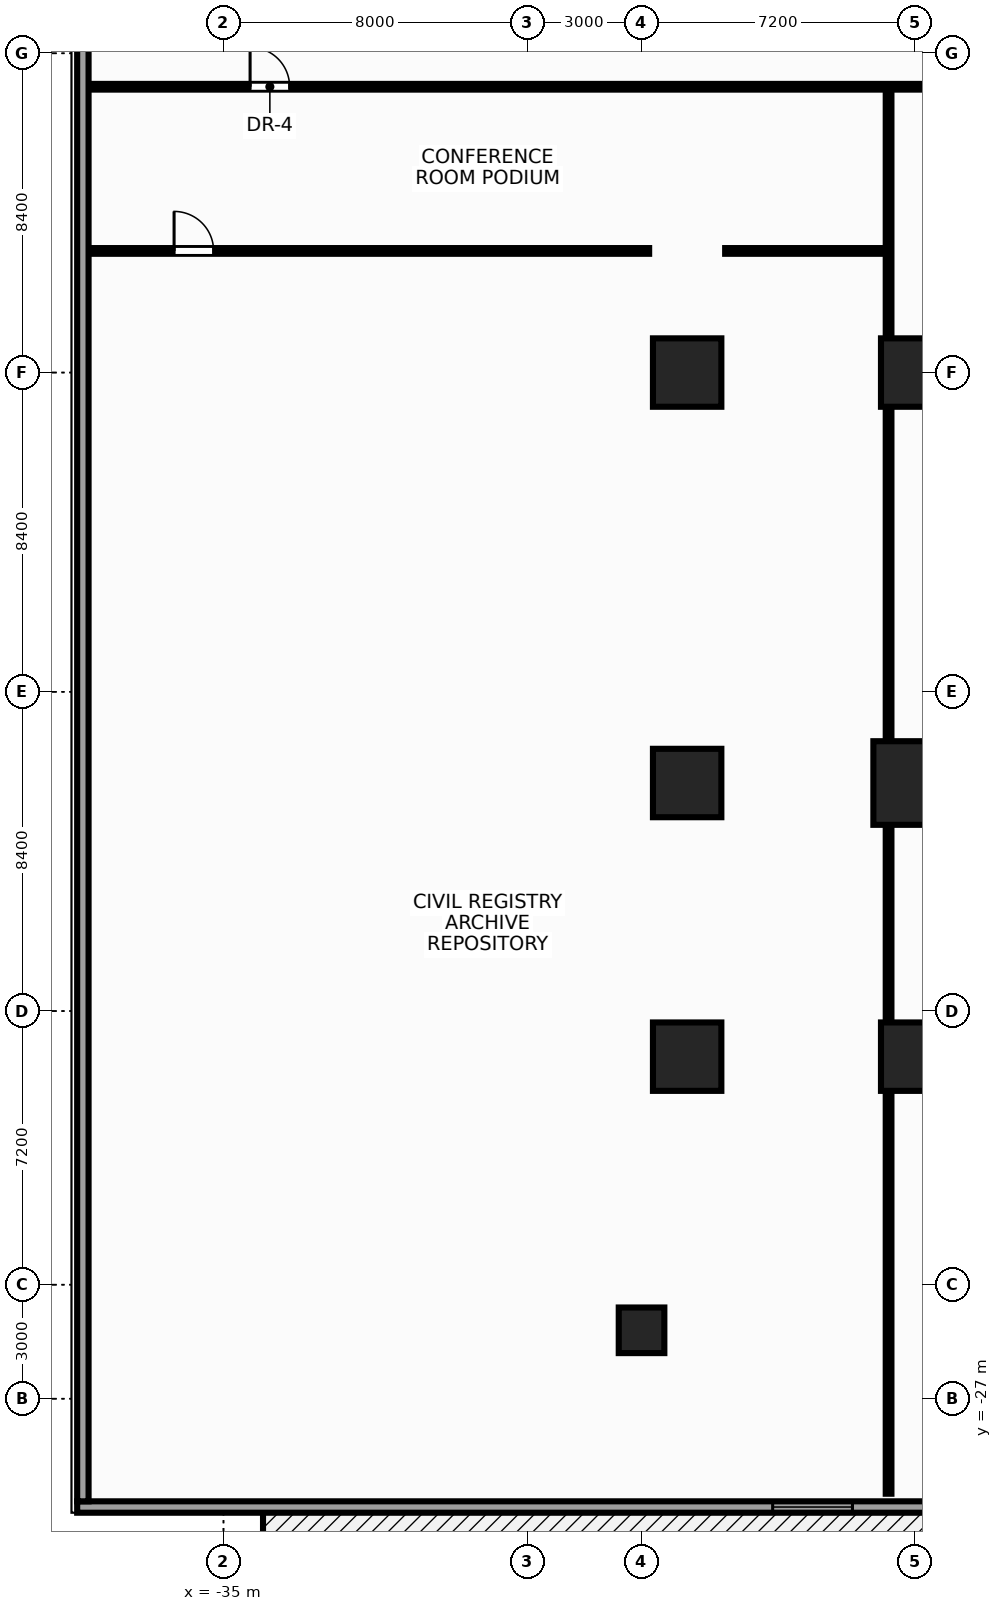
"""IFC4 building model, lengths in metres.
Left out: names, types, materials, properties, quantities, classifications, styles, units other than length and angle.
Written with IfcOpenShell. Run it as: python <this file> out.ifc"""

import sys

from ifc_helpers import new_model, si_unit, direction, frame, frame_2d, origin, origin_2d, place, context, subcontext, project, spatial, rectangle, hollow_rectangle, extrude, source, transform, mapped, element, fill, save


model = new_model("IFC4")
c1 = context("Model", 3, precision=1e-05, world=origin(), true_north=direction((0.0, 1.0)))
c2 = subcontext(c1, "Body", "Model", "MODEL_VIEW")
j1 = project(units=[si_unit("LENGTHUNIT", "METRE"), si_unit("PLANEANGLEUNIT", "RADIAN")], contexts=[c1])
p1 = place(None, origin())
s1 = spatial("IfcSite", under=j1, at=p1, CompositionType="ELEMENT")
p2 = place(p1, origin())
s2 = spatial("IfcBuilding", under=s1, at=p2, CompositionType="ELEMENT")
p3 = place(p2, frame((0.0, 0.0, 5.0)))
s3 = spatial("IfcBuildingStorey", under=s2, at=p3, CompositionType="ELEMENT", Elevation=5.0)
m1 = source(origin(), c2, "Body", "SweptSolid", [
    extrude(hollow_rectangle(XDim=1.2, YDim=1.2, WallThickness=0.055, at=origin_2d()), origin(), (0.0, 0.0, 1.0), 4.65),
])
p4 = place(p3, frame((-24.0, -25.2, 0.0), z_axis=(0.0, 0.0, 1.0), x_axis=(1.0, 0.0, 0.0)))
e1 = element("IfcColumn", 1, at=p4, inside=s3, PredefinedType="COLUMN", context=c2, shape_type="MappedRepresentation", body=[
    mapped(m1, transform((0.0, 0.0, 0.0), x_axis=(1.0, 0.0, 0.0), y_axis=(0.0, 1.0, 0.0), z_axis=(0.0, 0.0, 1.0), scale=1.0)),
])
m2 = source(origin(), c2, "Body", "SweptSolid", [
    extrude(rectangle(XDim=1.8, YDim=1.8, at=origin_2d()), origin(), (0.0, 0.0, 1.0), 4.65),
])
p5 = place(p3, frame((-16.8, -18.0, 0.0), z_axis=(0.0, 0.0, 1.0), x_axis=(1.0, 0.0, 0.0)))
e2 = element("IfcColumn", 2, at=p5, inside=s3, PredefinedType="COLUMN", context=c2, shape_type="MappedRepresentation", body=[
    mapped(m2, transform((0.0, 0.0, 0.0), x_axis=(1.0, 0.0, 0.0), y_axis=(0.0, 1.0, 0.0), z_axis=(0.0, 0.0, 1.0), scale=1.0)),
])
m3 = source(origin(), c2, "Body", "SweptSolid", [
    extrude(rectangle(XDim=2.2, YDim=2.2, at=origin_2d()), origin(), (0.0, 0.0, 1.0), 4.65),
])
p6 = place(p3, frame((-16.8, -10.8, 0.0), z_axis=(0.0, 0.0, 1.0), x_axis=(1.0, 0.0, 0.0)))
e3 = element("IfcColumn", 3, at=p6, inside=s3, PredefinedType="COLUMN", context=c2, shape_type="MappedRepresentation", body=[
    mapped(m3, transform((0.0, 0.0, 0.0), x_axis=(1.0, 0.0, 0.0), y_axis=(0.0, 1.0, 0.0), z_axis=(0.0, 0.0, 1.0), scale=1.0)),
])
for number, where, z_axis, x_axis in (
    (4, (-16.8, 0.0, 0.0), (0.0, 0.0, 1.0), (1.0, 0.0, 0.0)),
    (5, (-22.8, -18.0, 0.0), (0.0, 0.0, 1.0), (1.0, 0.0, 0.0)),
    (6, (-22.8, -10.8, 0.0), (0.0, 0.0, 1.0), (1.0, 0.0, 0.0)),
    (7, (-22.8, 0.0, 0.0), (0.0, 0.0, 1.0), (1.0, 0.0, 0.0)),
):
    element("IfcColumn", number, at=place(p3, frame(where, z_axis=z_axis, x_axis=x_axis)), inside=s3, PredefinedType="COLUMN", context=c2, shape_type="MappedRepresentation", body=[
        mapped(m2, transform((0.0, 0.0, 0.0), x_axis=(1.0, 0.0, 0.0), y_axis=(0.0, 1.0, 0.0), z_axis=(0.0, 0.0, 1.0), scale=1.0)),
    ])
m4 = source(origin(), c2, "Body", "SweptSolid", [
    extrude(rectangle(XDim=77.7, YDim=0.3, at=frame_2d((38.85, 0.0))), origin(), (0.0, 0.0, 1.0), 3.87),
])
p7 = place(p3, frame((38.85, -29.85, 0.0), z_axis=(0.0, 0.0, 1.0), x_axis=(-1.0, 0.0, 0.0)))
e8 = element("IfcWall", 8, at=p7, inside=s3, PredefinedType="STANDARD", context=c2, shape_type="MappedRepresentation", body=[
    mapped(m4, transform((0.0, 0.0, 0.0), x_axis=(1.0, 0.0, 0.0), y_axis=(0.0, 1.0, 0.0), z_axis=(0.0, 0.0, 1.0), scale=1.0)),
])
p8 = place(p7, frame((18.3, 0.0, 0.9)))
e9 = element("IfcOpeningElement", 9, at=p8, cuts=e8, PredefinedType="OPENING", context=c2, shape_type="SweptSolid", body=[
    extrude(rectangle(XDim=2.1, YDim=2.3, at=frame_2d((1.05, 1.15))), frame((0.0, 0.162, 0.0), z_axis=(0.0, -1.0, 0.0), x_axis=(1.0, 0.0, 0.0)), (0.0, 0.0, 1.0), 0.324),
])
p9 = place(p7, frame((24.8, 0.0, 0.9)))
e10 = element("IfcOpeningElement", 10, at=p9, cuts=e8, PredefinedType="OPENING", context=c2, shape_type="SweptSolid", body=[
    extrude(rectangle(XDim=2.1, YDim=2.3, at=frame_2d((1.05, 1.15))), frame((0.0, 0.162, 0.0), z_axis=(0.0, -1.0, 0.0), x_axis=(1.0, 0.0, 0.0)), (0.0, 0.0, 1.0), 0.324),
])
p10 = place(p7, frame((50.8, 0.0, 0.9)))
e11 = element("IfcOpeningElement", 11, at=p10, cuts=e8, PredefinedType="OPENING", context=c2, shape_type="SweptSolid", body=[
    extrude(rectangle(XDim=2.1, YDim=2.3, at=frame_2d((1.05, 1.15))), frame((0.0, 0.162, 0.0), z_axis=(0.0, -1.0, 0.0), x_axis=(1.0, 0.0, 0.0)), (0.0, 0.0, 1.0), 0.324),
])
p11 = place(p7, frame((57.3, 0.0, 0.9)))
e12 = element("IfcOpeningElement", 12, at=p11, cuts=e8, PredefinedType="OPENING", context=c2, shape_type="SweptSolid", body=[
    extrude(rectangle(XDim=2.1, YDim=2.3, at=frame_2d((1.05, 1.15))), frame((0.0, 0.162, 0.0), z_axis=(0.0, -1.0, 0.0), x_axis=(1.0, 0.0, 0.0)), (0.0, 0.0, 1.0), 0.324),
])
p12 = place(p7, frame((34.35, 0.0, 0.0)))
e13 = element("IfcOpeningElement", 13, at=p12, cuts=e8, PredefinedType="OPENING", context=c2, shape_type="SweptSolid", body=[
    extrude(rectangle(XDim=1.8, YDim=2.2, at=frame_2d((0.9, 1.1))), frame((0.0, 0.162, 0.0), z_axis=(0.0, -1.0, 0.0), x_axis=(1.0, 0.0, 0.0)), (0.0, 0.0, 1.0), 0.324),
])
p13 = place(p7, frame((42.35, 0.0, 0.0)))
e14 = element("IfcOpeningElement", 14, at=p13, cuts=e8, PredefinedType="OPENING", context=c2, shape_type="SweptSolid", body=[
    extrude(rectangle(XDim=1.8, YDim=2.2, at=frame_2d((0.9, 1.1))), frame((0.0, 0.162, 0.0), z_axis=(0.0, -1.0, 0.0), x_axis=(1.0, 0.0, 0.0)), (0.0, 0.0, 1.0), 0.324),
])
m5 = source(origin(), c2, "Body", "SweptSolid", [
    extrude(rectangle(XDim=55.99, YDim=0.3, at=frame_2d((27.995, 0.0))), origin(), (0.0, 0.0, 1.0), 3.87),
])
p14 = place(p3, frame((-38.7, -29.7, 0.0), z_axis=(0.0, 0.0, 1.0), x_axis=(0.0, 1.0, 0.0)))
e15 = element("IfcWall", 15, at=p14, inside=s3, PredefinedType="STANDARD", context=c2, shape_type="MappedRepresentation", body=[
    mapped(m5, transform((0.0, 0.0, 0.0), x_axis=(1.0, 0.0, 0.0), y_axis=(0.0, 1.0, 0.0), z_axis=(0.0, 0.0, 1.0), scale=1.0)),
])
m6 = source(origin(), c2, "Body", "SweptSolid", [
    extrude(rectangle(XDim=77.0, YDim=0.15, at=frame_2d((38.5, 0.0))), origin(), (0.0, 0.0, 1.0), 3.755),
])
p15 = place(p3, frame((-38.5, 7.52, 0.0), z_axis=(0.0, 0.0, 1.0), x_axis=(1.0, 0.0, 0.0)))
e16 = element("IfcWall", 16, at=p15, inside=s3, PredefinedType="PARTITIONING", context=c2, shape_type="MappedRepresentation", body=[
    mapped(m6, transform((0.0, 0.0, 0.0), x_axis=(1.0, 0.0, 0.0), y_axis=(0.0, 1.0, 0.0), z_axis=(0.0, 0.0, 1.0), scale=1.0)),
])
p16 = place(p15, frame((4.2, 0.0, 0.0)))
e17 = element("IfcOpeningElement", 17, at=p16, cuts=e16, PredefinedType="OPENING", context=c2, shape_type="SweptSolid", body=[
    extrude(rectangle(XDim=1.04, YDim=2.2, at=frame_2d((0.52, 1.1))), frame((0.0, 0.087, 0.0), z_axis=(0.0, -1.0, 0.0), x_axis=(1.0, 0.0, 0.0)), (0.0, 0.0, 1.0), 0.174),
])
p17 = place(p15, frame((37.7, 0.0, 0.0)))
e18 = element("IfcOpeningElement", 18, at=p17, cuts=e16, PredefinedType="OPENING", context=c2, shape_type="SweptSolid", body=[
    extrude(rectangle(XDim=1.65, YDim=2.35, at=frame_2d((0.825, 1.175))), frame((0.0, 0.087, 0.0), z_axis=(0.0, -1.0, 0.0), x_axis=(1.0, 0.0, 0.0)), (0.0, 0.0, 1.0), 0.174),
])
p18 = place(p15, frame((71.7, 0.0, 0.0)))
e19 = element("IfcOpeningElement", 19, at=p18, cuts=e16, PredefinedType="OPENING", context=c2, shape_type="SweptSolid", body=[
    extrude(rectangle(XDim=1.04, YDim=2.2, at=frame_2d((0.52, 1.1))), frame((0.0, 0.087, 0.0), z_axis=(0.0, -1.0, 0.0), x_axis=(1.0, 0.0, 0.0)), (0.0, 0.0, 1.0), 0.174),
])
m7 = source(origin(), c2, "Body", "SweptSolid", [
    extrude(rectangle(XDim=36.88, YDim=0.15, at=frame_2d((18.44, 0.0))), origin(), (0.0, 0.0, 1.0), 3.655),
])
p19 = place(p3, frame((-17.5, -29.5, 0.0), z_axis=(0.0, 0.0, 1.0), x_axis=(0.0, 1.0, 0.0)))
e20 = element("IfcWall", 20, at=p19, inside=s3, PredefinedType="PARTITIONING", context=c2, shape_type="MappedRepresentation", body=[
    mapped(m7, transform((0.0, 0.0, 0.0), x_axis=(1.0, 0.0, 0.0), y_axis=(0.0, 1.0, 0.0), z_axis=(0.0, 0.0, 1.0), scale=1.0)),
])
m8 = source(origin(), c2, "Body", "SweptSolid", [
    extrude(rectangle(XDim=14.7, YDim=0.15, at=frame_2d((7.35, 0.0))), origin(), (0.0, 0.0, 1.0), 4.37),
])
p20 = place(p3, frame((-38.5, 3.2, 0.0), z_axis=(0.0, 0.0, 1.0), x_axis=(1.0, 0.0, 0.0)))
e21 = element("IfcWall", 21, at=p20, inside=s3, PredefinedType="PARTITIONING", context=c2, shape_type="MappedRepresentation", body=[
    mapped(m8, transform((0.0, 0.0, 0.0), x_axis=(1.0, 0.0, 0.0), y_axis=(0.0, 1.0, 0.0), z_axis=(0.0, 0.0, 1.0), scale=1.0)),
])
p21 = place(p20, frame((2.2, 0.0, 0.0)))
e22 = element("IfcOpeningElement", 22, at=p21, cuts=e21, PredefinedType="OPENING", context=c2, shape_type="SweptSolid", body=[
    extrude(rectangle(XDim=1.04, YDim=2.2, at=frame_2d((0.52, 1.1))), frame((0.0, 0.087, 0.0), z_axis=(0.0, -1.0, 0.0), x_axis=(1.0, 0.0, 0.0)), (0.0, 0.0, 1.0), 0.174),
])
m9 = source(origin(), c2, "Body", "SweptSolid", [
    extrude(rectangle(XDim=4.18, YDim=0.15, at=frame_2d((2.09, 0.0))), origin(), (0.0, 0.0, 1.0), 4.37),
])
p22 = place(p3, frame((-21.8, 3.2, 0.0), z_axis=(0.0, 0.0, 1.0), x_axis=(1.0, 0.0, 0.0)))
e23 = element("IfcWall", 23, at=p22, inside=s3, PredefinedType="PARTITIONING", context=c2, shape_type="MappedRepresentation", body=[
    mapped(m9, transform((0.0, 0.0, 0.0), x_axis=(1.0, 0.0, 0.0), y_axis=(0.0, 1.0, 0.0), z_axis=(0.0, 0.0, 1.0), scale=1.0)),
])
m10 = source(origin(), c2, "Body", "SweptSolid", [
    extrude(rectangle(XDim=2.1, YDim=2.3, at=frame_2d((1.05, 1.15))), frame((0.0, 0.03, 0.0), z_axis=(0.0, -1.0, 0.0), x_axis=(1.0, 0.0, 0.0)), (0.0, 0.0, 1.0), 0.06),
])
p23 = place(p11, origin())
e24 = element("IfcWindow", 24, at=p23, inside=s3, PartitioningType="SINGLE_PANEL", PredefinedType="WINDOW", context=c2, shape_type="MappedRepresentation", body=[
    mapped(m10, transform((0.0, 0.0, 0.0), x_axis=(1.0, 0.0, 0.0), y_axis=(0.0, 1.0, 0.0), z_axis=(0.0, 0.0, 1.0), scale=1.0)),
])
fill(e12, e24)
m11 = source(origin(), c2, "Body", "SweptSolid", [
    extrude(rectangle(XDim=1.04, YDim=2.2, at=frame_2d((0.52, 1.1))), frame((0.0, 0.025, 0.0), z_axis=(0.0, -1.0, 0.0), x_axis=(1.0, 0.0, 0.0)), (0.0, 0.0, 1.0), 0.05),
])
p24 = place(p16, origin())
e25 = element("IfcDoor", 25, at=p24, inside=s3, OperationType="SINGLE_SWING_LEFT", PredefinedType="DOOR", context=c2, shape_type="MappedRepresentation", body=[
    mapped(m11, transform((0.0, 0.0, 0.0), x_axis=(1.0, 0.0, 0.0), y_axis=(0.0, 1.0, 0.0), z_axis=(0.0, 0.0, 1.0), scale=1.0)),
])
fill(e17, e25)
p25 = place(p21, origin())
e26 = element("IfcDoor", 26, at=p25, inside=s3, OperationType="SINGLE_SWING_LEFT", PredefinedType="DOOR", context=c2, shape_type="MappedRepresentation", body=[
    mapped(m11, transform((0.0, 0.0, 0.0), x_axis=(1.0, 0.0, 0.0), y_axis=(0.0, 1.0, 0.0), z_axis=(0.0, 0.0, 1.0), scale=1.0)),
])
fill(e22, e26)
save(model, sys.argv[1])
